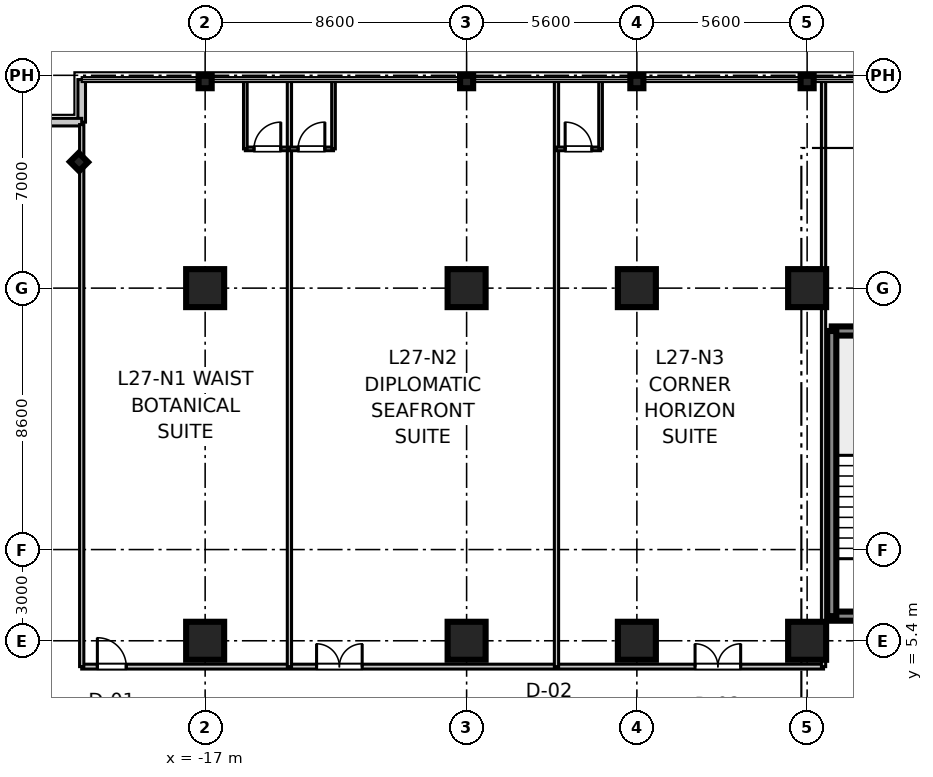
"""IFC4 building model, lengths in metres.
Left out: names, types, materials, properties, quantities, classifications, styles, units other than length and angle.
Written with IfcOpenShell. Run it as: python <this file> out.ifc"""

import sys

from ifc_helpers import new_model, si_unit, direction, frame, frame_2d, origin, origin_2d, place, context, subcontext, project, spatial, rectangle, i_section, extrude, source, transform, mapped, element, fill, save


model = new_model("IFC4")
c1 = context("Model", 3, precision=1e-05, world=origin(), true_north=direction((0.0, 1.0)))
c2 = subcontext(c1, "Body", "Model", "MODEL_VIEW")
j1 = project(units=[si_unit("LENGTHUNIT", "METRE"), si_unit("PLANEANGLEUNIT", "RADIAN")], contexts=[c1])
p1 = place(None, origin())
s1 = spatial("IfcSite", under=j1, at=p1, CompositionType="ELEMENT")
p2 = place(p1, origin())
s2 = spatial("IfcBuilding", under=s1, at=p2, CompositionType="ELEMENT")
p3 = place(p2, frame((0.0, 0.0, 110.2)))
s3 = spatial("IfcBuildingStorey", under=s2, at=p3, CompositionType="ELEMENT", Elevation=110.2)
m1 = source(origin(), c2, "Body", "SweptSolid", [
    extrude(rectangle(XDim=1.25, YDim=1.25, at=origin_2d()), origin(), (0.0, 0.0, 1.0), 3.605),
])
for number, where, z_axis, x_axis in (
    (1, (-17.0, 5.4, 0.0), (0.0, 0.0, 1.0), (1.0, 0.0, 0.0)),
    (2, (-17.0, 17.0, 0.0), (0.0, 0.0, 1.0), (1.0, 0.0, 0.0)),
    (3, (-8.4, 5.4, 0.0), (0.0, 0.0, 1.0), (1.0, 0.0, 0.0)),
    (4, (-8.4, 17.0, 0.0), (0.0, 0.0, 1.0), (1.0, 0.0, 0.0)),
    (5, (-2.8, 5.4, 0.0), (0.0, 0.0, 1.0), (1.0, 0.0, 0.0)),
    (6, (-2.8, 17.0, 0.0), (0.0, 0.0, 1.0), (1.0, 0.0, 0.0)),
    (7, (2.8, 5.4, 0.0), (0.0, 0.0, 1.0), (1.0, 0.0, 0.0)),
    (8, (2.8, 17.0, 0.0), (0.0, 0.0, 1.0), (1.0, 0.0, 0.0)),
):
    element("IfcColumn", number, at=place(p3, frame(where, z_axis=z_axis, x_axis=x_axis)), inside=s3, PredefinedType="COLUMN", context=c2, shape_type="MappedRepresentation", body=[
        mapped(m1, transform((0.0, 0.0, 0.0), scale=1.0)),
    ])
m2 = source(origin(), c2, "Body", "SweptSolid", [
    extrude(i_section(OverallWidth=0.409, OverallDepth=0.43, WebThickness=0.021, FlangeThickness=0.034, at=origin_2d()), origin(), (0.0, 0.0, 1.0), 3.605),
])
for number, where, z_axis, x_axis in (
    (9, (-17.0, 23.78, 0.0), (0.0, 0.0, 1.0), (0.0, 1.0, 0.0)),
    (10, (-8.4, 23.78, 0.0), (0.0, 0.0, 1.0), (0.0, 1.0, 0.0)),
    (11, (-2.8, 23.78, 0.0), (0.0, 0.0, 1.0), (0.0, 1.0, 0.0)),
    (12, (2.8, 23.78, 0.0), (0.0, 0.0, 1.0), (0.0, 1.0, 0.0)),
    (13, (-21.15, 21.15, 0.0), (0.0, 0.0, 1.0), (0.707, 0.707, 0.0)),
):
    element("IfcColumn", number, at=place(p3, frame(where, z_axis=z_axis, x_axis=x_axis)), inside=s3, PredefinedType="COLUMN", context=c2, shape_type="MappedRepresentation", body=[
        mapped(m2, transform((0.0, 0.0, 0.0), scale=1.0)),
    ])
m3 = source(origin(), c2, "Body", "SweptSolid", [
    extrude(rectangle(XDim=3.98, YDim=0.3, at=frame_2d((1.99, 0.0))), origin(), (0.0, 0.0, 1.0), 3.38),
])
for number, where, z_axis, x_axis in (
    (14, (3.61, 6.21, 0.0), (0.0, 0.0, 1.0), (1.0, 0.0, 0.0)),
    (15, (3.61, 15.59, 0.0), (0.0, 0.0, 1.0), (1.0, 0.0, 0.0)),
):
    element("IfcWall", number, at=place(p3, frame(where, z_axis=z_axis, x_axis=x_axis)), inside=s3, PredefinedType="SHEAR", context=c2, shape_type="MappedRepresentation", body=[
        mapped(m3, transform((0.0, 0.0, 0.0), scale=1.0)),
    ])
m4 = source(origin(), c2, "Body", "SweptSolid", [
    extrude(rectangle(XDim=9.38, YDim=0.3, at=frame_2d((4.69, 0.0))), origin(), (0.0, 0.0, 1.0), 3.38),
])
p4 = place(p3, frame((3.61, 6.21, 0.0), z_axis=(0.0, 0.0, 1.0), x_axis=(0.0, 1.0, 0.0)))
e16 = element("IfcWall", 16, at=p4, inside=s3, PredefinedType="SHEAR", context=c2, shape_type="MappedRepresentation", body=[
    mapped(m4, transform((0.0, 0.0, 0.0), scale=1.0)),
])
m5 = source(origin(), c2, "Body", "SweptSolid", [
    extrude(rectangle(XDim=1.4, YDim=0.25, at=frame_2d((0.7, 0.0))), origin(), (0.0, 0.0, 1.0), 3.38),
])
p5 = place(p3, frame((-21.06, 22.46, 0.0), z_axis=(0.0, 0.0, 1.0), x_axis=(0.0, 1.0, 0.0)))
e17 = element("IfcWall", 17, at=p5, inside=s3, PredefinedType="STANDARD", context=c2, shape_type="MappedRepresentation", body=[
    mapped(m5, transform((0.0, 0.0, 0.0), scale=1.0)),
])
m6 = source(origin(), c2, "Body", "SweptSolid", [
    extrude(rectangle(XDim=1.4, YDim=0.25, at=frame_2d((0.7, 0.0))), origin(), (0.0, 0.0, 1.0), 3.38),
])
p6 = place(p3, frame((-22.46, 22.46, 0.0), z_axis=(0.0, 0.0, 1.0), x_axis=(1.0, 0.0, 0.0)))
e18 = element("IfcWall", 18, at=p6, inside=s3, PredefinedType="STANDARD", context=c2, shape_type="MappedRepresentation", body=[
    mapped(m6, transform((0.0, 0.0, 0.0), scale=1.0)),
])
m7 = source(origin(), c2, "Body", "SweptSolid", [
    extrude(rectangle(XDim=24.4, YDim=0.16, at=frame_2d((12.2, 0.0))), origin(), (0.0, 0.0, 1.0), 2.72),
])
p7 = place(p3, frame((-21.06, 4.55, 0.0), z_axis=(0.0, 0.0, 1.0), x_axis=(1.0, 0.0, 0.0)))
e19 = element("IfcWall", 19, at=p7, inside=s3, PredefinedType="PARTITIONING", context=c2, shape_type="MappedRepresentation", body=[
    mapped(m7, transform((0.0, 0.0, 0.0), scale=1.0)),
])
p8 = place(p7, frame((0.515, 0.0, 0.0)))
e20 = element("IfcOpeningElement", 20, at=p8, cuts=e19, PredefinedType="OPENING", context=c2, shape_type="SweptSolid", body=[
    extrude(rectangle(XDim=0.95, YDim=2.1, at=frame_2d((0.475, 1.05))), frame((0.0, 0.09, 0.0), z_axis=(0.0, -1.0, 0.0), x_axis=(1.0, 0.0, 0.0)), (0.0, 0.0, 1.0), 0.18),
])
p9 = place(p7, frame((7.725, 0.0, 0.0)))
e21 = element("IfcOpeningElement", 21, at=p9, cuts=e19, PredefinedType="OPENING", context=c2, shape_type="SweptSolid", body=[
    extrude(rectangle(XDim=1.5, YDim=2.15, at=frame_2d((0.75, 1.075))), frame((0.0, 0.09, 0.0), z_axis=(0.0, -1.0, 0.0), x_axis=(1.0, 0.0, 0.0)), (0.0, 0.0, 1.0), 0.18),
])
p10 = place(p7, frame((20.174, 0.0, 0.0)))
e22 = element("IfcOpeningElement", 22, at=p10, cuts=e19, PredefinedType="OPENING", context=c2, shape_type="SweptSolid", body=[
    extrude(rectangle(XDim=1.5, YDim=2.15, at=frame_2d((0.75, 1.075))), frame((0.0, 0.09, 0.0), z_axis=(0.0, -1.0, 0.0), x_axis=(1.0, 0.0, 0.0)), (0.0, 0.0, 1.0), 0.18),
])
m8 = source(origin(), c2, "Body", "SweptSolid", [
    extrude(rectangle(XDim=17.83, YDim=0.14, at=frame_2d((8.915, 0.0))), origin(), (0.0, 0.0, 1.0), 2.72),
])
p11 = place(p3, frame((-21.06, 4.55, 0.0), z_axis=(0.0, 0.0, 1.0), x_axis=(0.0, 1.0, 0.0)))
e23 = element("IfcWall", 23, at=p11, inside=s3, PredefinedType="PARTITIONING", context=c2, shape_type="MappedRepresentation", body=[
    mapped(m8, transform((0.0, 0.0, 0.0), scale=1.0)),
])
m9 = source(origin(), c2, "Body", "SweptSolid", [
    extrude(rectangle(XDim=19.25, YDim=0.14, at=frame_2d((9.625, 0.0))), origin(), (0.0, 0.0, 1.0), 2.72),
])
p12 = place(p3, frame((3.34, 4.55, 0.0), z_axis=(0.0, 0.0, 1.0), x_axis=(0.0, 1.0, 0.0)))
e24 = element("IfcWall", 24, at=p12, inside=s3, PredefinedType="PARTITIONING", context=c2, shape_type="MappedRepresentation", body=[
    mapped(m9, transform((0.0, 0.0, 0.0), scale=1.0)),
])
m10 = source(origin(), c2, "Body", "SweptSolid", [
    extrude(rectangle(XDim=1.45, YDim=0.12, at=frame_2d((0.725, 0.0))), origin(), (0.0, 0.0, 1.0), 2.72),
])
p13 = place(p3, frame((-15.678, 21.58, 0.0), z_axis=(0.0, 0.0, 1.0), x_axis=(1.0, 0.0, 0.0)))
e25 = element("IfcWall", 25, at=p13, inside=s3, PredefinedType="PARTITIONING", context=c2, shape_type="MappedRepresentation", body=[
    mapped(m10, transform((0.0, 0.0, 0.0), scale=1.0)),
])
p14 = place(p13, frame((0.285, 0.0, 0.0)))
e26 = element("IfcOpeningElement", 26, at=p14, cuts=e25, PredefinedType="OPENING", context=c2, shape_type="SweptSolid", body=[
    extrude(rectangle(XDim=0.88, YDim=2.1, at=frame_2d((0.44, 1.05))), frame((0.0, 0.07, 0.0), z_axis=(0.0, -1.0, 0.0), x_axis=(1.0, 0.0, 0.0)), (0.0, 0.0, 1.0), 0.14),
])
m11 = source(origin(), c2, "Body", "SweptSolid", [
    extrude(rectangle(XDim=2.22, YDim=0.12, at=frame_2d((1.11, 0.0))), origin(), (0.0, 0.0, 1.0), 2.72),
])
p15 = place(p3, frame((-15.678, 21.58, 0.0), z_axis=(0.0, 0.0, 1.0), x_axis=(0.0, 1.0, 0.0)))
e27 = element("IfcWall", 27, at=p15, inside=s3, PredefinedType="PARTITIONING", context=c2, shape_type="MappedRepresentation", body=[
    mapped(m11, transform((0.0, 0.0, 0.0), scale=1.0)),
])
p16 = place(p3, frame((-14.228, 4.55, 0.0), z_axis=(0.0, 0.0, 1.0), x_axis=(0.0, 1.0, 0.0)))
e28 = element("IfcWall", 28, at=p16, inside=s3, PredefinedType="PARTITIONING", context=c2, shape_type="MappedRepresentation", body=[
    mapped(m9, transform((0.0, 0.0, 0.0), scale=1.0)),
])
p17 = place(p3, frame((-14.228, 21.58, 0.0), z_axis=(0.0, 0.0, 1.0), x_axis=(1.0, 0.0, 0.0)))
e29 = element("IfcWall", 29, at=p17, inside=s3, PredefinedType="PARTITIONING", context=c2, shape_type="MappedRepresentation", body=[
    mapped(m10, transform((0.0, 0.0, 0.0), scale=1.0)),
])
p18 = place(p17, frame((0.285, 0.0, 0.0)))
e30 = element("IfcOpeningElement", 30, at=p18, cuts=e29, PredefinedType="OPENING", context=c2, shape_type="SweptSolid", body=[
    extrude(rectangle(XDim=0.88, YDim=2.1, at=frame_2d((0.44, 1.05))), frame((0.0, 0.07, 0.0), z_axis=(0.0, -1.0, 0.0), x_axis=(1.0, 0.0, 0.0)), (0.0, 0.0, 1.0), 0.14),
])
p19 = place(p3, frame((-12.778, 21.58, 0.0), z_axis=(0.0, 0.0, 1.0), x_axis=(0.0, 1.0, 0.0)))
e31 = element("IfcWall", 31, at=p19, inside=s3, PredefinedType="PARTITIONING", context=c2, shape_type="MappedRepresentation", body=[
    mapped(m11, transform((0.0, 0.0, 0.0), scale=1.0)),
])
p20 = place(p3, frame((-5.444, 4.55, 0.0), z_axis=(0.0, 0.0, 1.0), x_axis=(0.0, 1.0, 0.0)))
e32 = element("IfcWall", 32, at=p20, inside=s3, PredefinedType="PARTITIONING", context=c2, shape_type="MappedRepresentation", body=[
    mapped(m9, transform((0.0, 0.0, 0.0), scale=1.0)),
])
m12 = source(origin(), c2, "Body", "SweptSolid", [
    extrude(rectangle(XDim=1.45, YDim=0.12, at=frame_2d((0.725, 0.0))), origin(), (0.0, 0.0, 1.0), 2.72),
])
p21 = place(p3, frame((-5.444, 21.58, 0.0), z_axis=(0.0, 0.0, 1.0), x_axis=(1.0, 0.0, 0.0)))
e33 = element("IfcWall", 33, at=p21, inside=s3, PredefinedType="PARTITIONING", context=c2, shape_type="MappedRepresentation", body=[
    mapped(m12, transform((0.0, 0.0, 0.0), scale=1.0)),
])
p22 = place(p21, frame((0.285, 0.0, 0.0)))
e34 = element("IfcOpeningElement", 34, at=p22, cuts=e33, PredefinedType="OPENING", context=c2, shape_type="SweptSolid", body=[
    extrude(rectangle(XDim=0.88, YDim=2.1, at=frame_2d((0.44, 1.05))), frame((0.0, 0.07, 0.0), z_axis=(0.0, -1.0, 0.0), x_axis=(1.0, 0.0, 0.0)), (0.0, 0.0, 1.0), 0.14),
])
p23 = place(p3, frame((-3.994, 21.58, 0.0), z_axis=(0.0, 0.0, 1.0), x_axis=(0.0, 1.0, 0.0)))
e35 = element("IfcWall", 35, at=p23, inside=s3, PredefinedType="PARTITIONING", context=c2, shape_type="MappedRepresentation", body=[
    mapped(m11, transform((0.0, 0.0, 0.0), scale=1.0)),
])
m13 = source(origin(), c2, "Body", "SweptSolid", [
    extrude(rectangle(XDim=0.88, YDim=2.1, at=frame_2d((0.44, 1.05))), frame((0.0, 0.025, 0.0), z_axis=(0.0, -1.0, 0.0), x_axis=(1.0, 0.0, 0.0)), (0.0, 0.0, 1.0), 0.05),
])
p24 = place(p14, origin())
e36 = element("IfcDoor", 36, at=p24, inside=s3, OperationType="SINGLE_SWING_RIGHT", PredefinedType="DOOR", context=c2, shape_type="MappedRepresentation", body=[
    mapped(m13, transform((0.0, 0.0, 0.0), scale=1.0)),
])
fill(e26, e36)
m14 = source(origin(), c2, "Body", "SweptSolid", [
    extrude(rectangle(XDim=0.95, YDim=2.1, at=frame_2d((0.475, 1.05))), frame((0.0, 0.025, 0.0), z_axis=(0.0, -1.0, 0.0), x_axis=(1.0, 0.0, 0.0)), (0.0, 0.0, 1.0), 0.05),
])
p25 = place(p8, origin())
e37 = element("IfcDoor", 37, at=p25, inside=s3, OperationType="SINGLE_SWING_LEFT", PredefinedType="DOOR", context=c2, shape_type="MappedRepresentation", body=[
    mapped(m14, transform((0.0, 0.0, 0.0), scale=1.0)),
])
fill(e20, e37)
p26 = place(p18, origin())
e38 = element("IfcDoor", 38, at=p26, inside=s3, OperationType="SINGLE_SWING_RIGHT", PredefinedType="DOOR", context=c2, shape_type="MappedRepresentation", body=[
    mapped(m13, transform((0.0, 0.0, 0.0), scale=1.0)),
])
fill(e30, e38)
m15 = source(origin(), c2, "Body", "SweptSolid", [
    extrude(rectangle(XDim=1.5, YDim=2.15, at=frame_2d((0.75, 1.075))), frame((0.0, 0.025, 0.0), z_axis=(0.0, -1.0, 0.0), x_axis=(1.0, 0.0, 0.0)), (0.0, 0.0, 1.0), 0.05),
])
p27 = place(p9, origin())
e39 = element("IfcDoor", 39, at=p27, inside=s3, OperationType="DOUBLE_DOOR_SINGLE_SWING", PredefinedType="DOOR", context=c2, shape_type="MappedRepresentation", body=[
    mapped(m15, transform((0.0, 0.0, 0.0), scale=1.0)),
])
fill(e21, e39)
p28 = place(p22, origin())
e40 = element("IfcDoor", 40, at=p28, inside=s3, OperationType="SINGLE_SWING_LEFT", PredefinedType="DOOR", context=c2, shape_type="MappedRepresentation", body=[
    mapped(m13, transform((0.0, 0.0, 0.0), scale=1.0)),
])
fill(e34, e40)
p29 = place(p10, origin())
e41 = element("IfcDoor", 41, at=p29, inside=s3, OperationType="DOUBLE_DOOR_SINGLE_SWING", PredefinedType="DOOR", context=c2, shape_type="MappedRepresentation", body=[
    mapped(m15, transform((0.0, 0.0, 0.0), scale=1.0)),
])
fill(e22, e41)
save(model, sys.argv[1])
